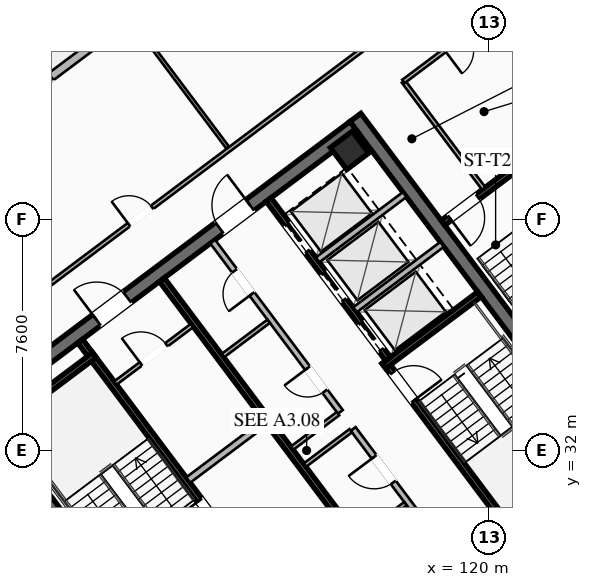
"""IFC4 building model, lengths in metres.
Left out: names, types, materials, properties, quantities, classifications, styles, units other than length and angle.
Written with IfcOpenShell. Run it as: python <this file> out.ifc"""

import sys

from ifc_helpers import new_model, si_unit, direction, frame, frame_2d, origin, origin_2d, place, context, subcontext, project, spatial, rectangle, hollow_rectangle, extrude, element, fill, save


model = new_model("IFC4")
c1 = context("Model", 3, precision=1e-05, world=origin(), true_north=direction((0.0, 1.0)))
c2 = subcontext(c1, "Body", "Model", "MODEL_VIEW")
j1 = project(units=[si_unit("LENGTHUNIT", "METRE"), si_unit("PLANEANGLEUNIT", "RADIAN")], contexts=[c1])
p1 = place(None, origin())
s1 = spatial("IfcSite", under=j1, at=p1, CompositionType="ELEMENT")
p2 = place(p1, origin())
s2 = spatial("IfcBuilding", under=s1, at=p2, CompositionType="ELEMENT")
p3 = place(p2, frame((0.0, 0.0, 236.15)))
s3 = spatial("IfcBuildingStorey", under=s2, at=p3, CompositionType="ELEMENT", Elevation=236.15)
for number, where, z_axis, x_axis in (
    (1, (112.396, 21.047, 0.0), (0.0, 0.0, 1.0), (-0.6, 0.8, 0.0)),
    (2, (115.604, 42.953, 0.0), (0.0, 0.0, 1.0), (0.6, -0.8, 0.0)),
):
    element("IfcWall", number, at=place(p3, frame(where, z_axis=z_axis, x_axis=x_axis)), inside=s3, PredefinedType="SHEAR", context=c2, shape_type="SweptSolid", body=[
        extrude(rectangle(XDim=15.6, YDim=0.45, at=frame_2d((7.8, 0.0))), origin(), (0.0, 0.0, 1.0), 3.55),
    ])
p4 = place(p3, frame((124.649, 30.518, 0.0), z_axis=(0.0, 0.0, 1.0), x_axis=(-0.8, -0.6, 0.0)))
e3 = element("IfcWall", 3, at=p4, inside=s3, PredefinedType="SHEAR", context=c2, shape_type="SweptSolid", body=[
    extrude(rectangle(XDim=15.26, YDim=0.45, at=frame_2d((7.63, 0.0))), origin(), (0.0, 0.0, 1.0), 3.55),
])
p5 = place(p4, frame((9.33, 0.0, 0.0)))
e4 = element("IfcOpeningElement", 4, at=p5, cuts=e3, PredefinedType="OPENING", context=c2, shape_type="SweptSolid", body=[
    extrude(rectangle(XDim=1.25, YDim=2.25, at=frame_2d((0.625, 1.125))), frame((0.0, 0.235, 0.0), z_axis=(0.0, -1.0, 0.0), x_axis=(1.0, 0.0, 0.0)), (0.0, 0.0, 1.0), 0.47),
])
p6 = place(p4, frame((4.28, 0.0, 0.0)))
e5 = element("IfcOpeningElement", 5, at=p6, cuts=e3, PredefinedType="OPENING", context=c2, shape_type="SweptSolid", body=[
    extrude(rectangle(XDim=1.25, YDim=2.25, at=frame_2d((0.625, 1.125))), frame((0.0, 0.235, 0.0), z_axis=(0.0, -1.0, 0.0), x_axis=(1.0, 0.0, 0.0)), (0.0, 0.0, 1.0), 0.47),
])
p7 = place(p3, frame((103.351, 33.482, 0.0), z_axis=(0.0, 0.0, 1.0), x_axis=(0.8, 0.6, 0.0)))
e6 = element("IfcWall", 6, at=p7, inside=s3, PredefinedType="SHEAR", context=c2, shape_type="SweptSolid", body=[
    extrude(rectangle(XDim=15.26, YDim=0.45, at=frame_2d((7.63, 0.0))), origin(), (0.0, 0.0, 1.0), 3.55),
])
p8 = place(p7, frame((4.68, 0.0, 0.0)))
e7 = element("IfcOpeningElement", 7, at=p8, cuts=e6, PredefinedType="OPENING", context=c2, shape_type="SweptSolid", body=[
    extrude(rectangle(XDim=1.25, YDim=2.25, at=frame_2d((0.625, 1.125))), frame((0.0, 0.235, 0.0), z_axis=(0.0, -1.0, 0.0), x_axis=(1.0, 0.0, 0.0)), (0.0, 0.0, 1.0), 0.47),
])
p9 = place(p7, frame((9.73, 0.0, 0.0)))
e8 = element("IfcOpeningElement", 8, at=p9, cuts=e6, PredefinedType="OPENING", context=c2, shape_type="SweptSolid", body=[
    extrude(rectangle(XDim=1.25, YDim=2.25, at=frame_2d((0.625, 1.125))), frame((0.0, 0.235, 0.0), z_axis=(0.0, -1.0, 0.0), x_axis=(1.0, 0.0, 0.0)), (0.0, 0.0, 1.0), 0.47),
])
p10 = place(p3, frame((115.41, 41.87, 0.0), z_axis=(0.0, 0.0, 1.0), x_axis=(0.799999996291, 0.600000004945, 0.0)))
e9 = element("IfcColumn", 9, at=p10, inside=s3, PredefinedType="COLUMN", context=c2, shape_type="SweptSolid", body=[
    extrude(hollow_rectangle(XDim=0.9, YDim=0.9, WallThickness=0.04, at=origin_2d()), origin(), (0.0, 0.0, 1.0), 3.37),
])
p11 = place(p3, frame((101.672, 41.354, 0.0), z_axis=(0.0, 0.0, 1.0), x_axis=(0.799986212866, 0.600018382406, 0.0)))
e10 = element("IfcWall", 10, at=p11, inside=s3, PredefinedType="SOLIDWALL", context=c2, shape_type="SweptSolid", body=[
    extrude(rectangle(XDim=8.5, YDim=0.28, at=frame_2d((4.25, 0.0))), origin(), (0.0, 0.0, 1.0), 3.37),
])
p12 = place(p11, frame((3.6, 0.0, 0.0)))
e11 = element("IfcOpeningElement", 11, at=p12, cuts=e10, PredefinedType="OPENING", context=c2, shape_type="SweptSolid", body=[
    extrude(rectangle(XDim=1.3, YDim=2.15, at=frame_2d((0.65, 1.075))), frame((0.0, 0.15, 0.0), z_axis=(0.0, -1.0, 0.0), x_axis=(1.0, 0.0, 0.0)), (0.0, 0.0, 1.0), 0.3),
])
p13 = place(p11, frame((1.46, 0.0, 0.85)))
e12 = element("IfcOpeningElement", 12, at=p13, cuts=e10, PredefinedType="OPENING", context=c2, shape_type="SweptSolid", body=[
    extrude(rectangle(XDim=1.8, YDim=1.92, at=frame_2d((0.9, 0.96))), frame((0.0, 0.15, 0.0), z_axis=(0.0, -1.0, 0.0), x_axis=(1.0, 0.0, 0.0)), (0.0, 0.0, 1.0), 0.3),
])
p14 = place(p3, frame((111.44, 29.08, 0.0), z_axis=(0.0, 0.0, 1.0), x_axis=(-0.59999041401, 0.800007189403, 0.0)))
e13 = element("IfcWall", 13, at=p14, inside=s3, PredefinedType="SHEAR", context=c2, shape_type="SweptSolid", body=[
    extrude(rectangle(XDim=8.15, YDim=0.2, at=frame_2d((4.075, 0.0))), origin(), (0.0, 0.0, 1.0), 3.37),
])
p15 = place(p14, frame((0.45, 0.0, 0.0)))
e14 = element("IfcOpeningElement", 14, at=p15, cuts=e13, PredefinedType="OPENING", context=c2, shape_type="SweptSolid", body=[
    extrude(rectangle(XDim=1.15, YDim=2.2, at=frame_2d((0.575, 1.1))), frame((0.0, 0.11, 0.0), z_axis=(0.0, -1.0, 0.0), x_axis=(1.0, 0.0, 0.0)), (0.0, 0.0, 1.0), 0.22),
])
p16 = place(p3, frame((103.876, 32.782, 0.0), z_axis=(0.0, 0.0, 1.0), x_axis=(0.800014909178, 0.599980120581, 0.0)))
e15 = element("IfcWall", 15, at=p16, inside=s3, PredefinedType="SHEAR", context=c2, shape_type="SweptSolid", body=[
    extrude(rectangle(XDim=3.93, YDim=0.2, at=frame_2d((1.965, 0.0))), origin(), (0.0, 0.0, 1.0), 3.37),
])
p17 = place(p3, frame((116.56, 34.92, 0.0), z_axis=(0.0, 0.0, 1.0), x_axis=(0.59999041401, -0.800007189403, 0.0)))
e16 = element("IfcWall", 16, at=p17, inside=s3, PredefinedType="SHEAR", context=c2, shape_type="SweptSolid", body=[
    extrude(rectangle(XDim=8.15, YDim=0.2, at=frame_2d((4.075, 0.0))), origin(), (0.0, 0.0, 1.0), 3.37),
])
p18 = place(p17, frame((0.45, 0.0, 0.0)))
e17 = element("IfcOpeningElement", 17, at=p18, cuts=e16, PredefinedType="OPENING", context=c2, shape_type="SweptSolid", body=[
    extrude(rectangle(XDim=1.15, YDim=2.2, at=frame_2d((0.575, 1.1))), frame((0.0, 0.11, 0.0), z_axis=(0.0, -1.0, 0.0), x_axis=(1.0, 0.0, 0.0)), (0.0, 0.0, 1.0), 0.22),
])
p19 = place(p3, frame((116.54, 34.78, 0.0), z_axis=(0.0, 0.0, 1.0), x_axis=(0.800014909178, 0.599980120581, 0.0)))
e18 = element("IfcWall", 18, at=p19, inside=s3, PredefinedType="SHEAR", context=c2, shape_type="SweptSolid", body=[
    extrude(rectangle(XDim=3.93, YDim=0.2, at=frame_2d((1.965, 0.0))), origin(), (0.0, 0.0, 1.0), 3.37),
])
p20 = place(p3, frame((118.058, 25.856, 0.0), z_axis=(0.0, 0.0, 1.0), x_axis=(-0.600002657301, 0.799998007018, 0.0)))
e19 = element("IfcWall", 19, at=p20, inside=s3, PredefinedType="SHEAR", context=c2, shape_type="SweptSolid", body=[
    extrude(rectangle(XDim=14.7, YDim=0.2, at=frame_2d((7.35, 0.0))), origin(), (0.0, 0.0, 1.0), 3.37),
])
p21 = place(p3, frame((110.104, 31.028, 0.0), z_axis=(0.0, 0.0, 1.0), x_axis=(0.800018601094, 0.59997519774, 0.0)))
e20 = element("IfcWall", 20, at=p21, inside=s3, PredefinedType="SOLIDWALL", context=c2, shape_type="SweptSolid", body=[
    extrude(rectangle(XDim=3.15, YDim=0.22, at=frame_2d((1.575, 0.0))), origin(), (0.0, 0.0, 1.0), 2.723),
])
p22 = place(p3, frame((112.75, 40.25, 0.0), z_axis=(0.0, 0.0, 1.0), x_axis=(0.599994036198, -0.800004472816, 0.0)))
e21 = element("IfcWall", 21, at=p22, inside=s3, PredefinedType="SHEAR", context=c2, shape_type="SweptSolid", body=[
    extrude(rectangle(XDim=6.55, YDim=0.2, at=frame_2d((3.275, 0.0))), origin(), (0.0, 0.0, 1.0), 3.37),
])
p23 = place(p22, frame((5.075, 0.0, 0.0)))
e22 = element("IfcOpeningElement", 22, at=p23, cuts=e21, PredefinedType="OPENING", context=c2, shape_type="SweptSolid", body=[
    extrude(rectangle(XDim=1.1, YDim=2.2, at=frame_2d((0.55, 1.1))), frame((0.0, 0.11, 0.0), z_axis=(0.0, -1.0, 0.0), x_axis=(1.0, 0.0, 0.0)), (0.0, 0.0, 1.0), 0.22),
])
p24 = place(p22, frame((3.025, 0.0, 0.0)))
e23 = element("IfcOpeningElement", 23, at=p24, cuts=e21, PredefinedType="OPENING", context=c2, shape_type="SweptSolid", body=[
    extrude(rectangle(XDim=1.1, YDim=2.2, at=frame_2d((0.55, 1.1))), frame((0.0, 0.11, 0.0), z_axis=(0.0, -1.0, 0.0), x_axis=(1.0, 0.0, 0.0)), (0.0, 0.0, 1.0), 0.22),
])
p25 = place(p22, frame((1.025, 0.0, 0.0)))
e24 = element("IfcOpeningElement", 24, at=p25, cuts=e21, PredefinedType="OPENING", context=c2, shape_type="SweptSolid", body=[
    extrude(rectangle(XDim=1.1, YDim=2.2, at=frame_2d((0.55, 1.1))), frame((0.0, 0.11, 0.0), z_axis=(0.0, -1.0, 0.0), x_axis=(1.0, 0.0, 0.0)), (0.0, 0.0, 1.0), 0.22),
])
for number, where, z_axis, x_axis in (
    (25, (115.59, 36.63, 0.0), (0.0, 0.0, 1.0), (0.8, 0.6, 0.0)),
    (26, (114.36, 38.27, 0.0), (0.0, 0.0, 1.0), (0.8, 0.6, 0.0)),
):
    element("IfcWall", number, at=place(p3, frame(where, z_axis=z_axis, x_axis=x_axis)), inside=s3, PredefinedType="SOLIDWALL", context=c2, shape_type="SweptSolid", body=[
        extrude(rectangle(XDim=3.58, YDim=0.2, at=frame_2d((1.79, 0.0))), origin(), (0.0, 0.0, 1.0), 3.37),
    ])
p26 = place(p3, frame((107.71, 34.22, 0.0), z_axis=(0.0, 0.0, 1.0), x_axis=(0.799981399002, 0.60002480053, 0.0)))
e27 = element("IfcWall", 27, at=p26, inside=s3, PredefinedType="PARTITIONING", context=c2, shape_type="SweptSolid", body=[
    extrude(rectangle(XDim=3.15, YDim=0.135, at=frame_2d((1.575, 0.0))), origin(), (0.0, 0.0, 1.0), 2.723),
])
p27 = place(p26, frame((1.05, 0.0, 0.0)))
e28 = element("IfcOpeningElement", 28, at=p27, cuts=e27, PredefinedType="OPENING", context=c2, shape_type="SweptSolid", body=[
    extrude(rectangle(XDim=1.05, YDim=2.2, at=frame_2d((0.525, 1.1))), frame((0.0, 0.077, 0.0), z_axis=(0.0, -1.0, 0.0), x_axis=(1.0, 0.0, 0.0)), (0.0, 0.0, 1.0), 0.155),
])
p28 = place(p3, frame((119.73, 27.11, 0.0), z_axis=(0.0, 0.0, 1.0), x_axis=(-0.600005580459, 0.799995814625, 0.0)))
e29 = element("IfcWall", 29, at=p28, inside=s3, PredefinedType="SOLIDWALL", context=c2, shape_type="SweptSolid", body=[
    extrude(rectangle(XDim=7.0, YDim=0.2, at=frame_2d((3.5, 0.0))), origin(), (0.0, 0.0, 1.0), 2.723),
])
p29 = place(p28, frame((0.85, 0.0, 0.0)))
e30 = element("IfcOpeningElement", 30, at=p29, cuts=e29, PredefinedType="OPENING", context=c2, shape_type="SweptSolid", body=[
    extrude(rectangle(XDim=0.95, YDim=2.05, at=frame_2d((0.475, 1.025))), frame((0.0, 0.11, 0.0), z_axis=(0.0, -1.0, 0.0), x_axis=(1.0, 0.0, 0.0)), (0.0, 0.0, 1.0), 0.22),
])
p30 = place(p28, frame((4.8, 0.0, 0.0)))
e31 = element("IfcOpeningElement", 31, at=p30, cuts=e29, PredefinedType="OPENING", context=c2, shape_type="SweptSolid", body=[
    extrude(rectangle(XDim=1.05, YDim=2.2, at=frame_2d((0.525, 1.1))), frame((0.0, 0.11, 0.0), z_axis=(0.0, -1.0, 0.0), x_axis=(1.0, 0.0, 0.0)), (0.0, 0.0, 1.0), 0.22),
])
for number, where, z_axis, x_axis in (
    (32, (113.946, 31.522, 0.0), (0.0, 0.0, 1.0), (0.8, 0.6, 0.0)),
    (33, (115.746, 29.122, 0.0), (0.0, 0.0, 1.0), (0.8, 0.6, 0.0)),
):
    element("IfcWall", number, at=place(p3, frame(where, z_axis=z_axis, x_axis=x_axis)), inside=s3, PredefinedType="PARTITIONING", context=c2, shape_type="SweptSolid", body=[
        extrude(rectangle(XDim=1.88, YDim=0.135, at=frame_2d((0.94, 0.0))), origin(), (0.0, 0.0, 1.0), 2.723),
    ])
p31 = place(p3, frame((115.11, 33.27, 0.0), z_axis=(0.0, 0.0, 1.0), x_axis=(-0.600011160345, 0.79999162962, 0.0)))
e34 = element("IfcWall", 34, at=p31, inside=s3, PredefinedType="SOLIDWALL", context=c2, shape_type="SweptSolid", body=[
    extrude(rectangle(XDim=7.0, YDim=0.2, at=frame_2d((3.5, 0.0))), origin(), (0.0, 0.0, 1.0), 2.723),
])
p32 = place(p31, frame((0.85, 0.0, 0.0)))
e35 = element("IfcOpeningElement", 35, at=p32, cuts=e34, PredefinedType="OPENING", context=c2, shape_type="SweptSolid", body=[
    extrude(rectangle(XDim=0.95, YDim=2.05, at=frame_2d((0.475, 1.025))), frame((0.0, 0.11, 0.0), z_axis=(0.0, -1.0, 0.0), x_axis=(1.0, 0.0, 0.0)), (0.0, 0.0, 1.0), 0.22),
])
p33 = place(p31, frame((4.85, 0.0, 0.0)))
e36 = element("IfcOpeningElement", 36, at=p33, cuts=e34, PredefinedType="OPENING", context=c2, shape_type="SweptSolid", body=[
    extrude(rectangle(XDim=0.95, YDim=2.05, at=frame_2d((0.475, 1.025))), frame((0.0, 0.11, 0.0), z_axis=(0.0, -1.0, 0.0), x_axis=(1.0, 0.0, 0.0)), (0.0, 0.0, 1.0), 0.22),
])
p34 = place(p3, frame((113.526, 32.082, 0.0), z_axis=(0.0, 0.0, 1.0), x_axis=(0.800046745961, 0.599937666993, 0.0)))
e37 = element("IfcWall", 37, at=p34, inside=s3, PredefinedType="PARTITIONING", context=c2, shape_type="SweptSolid", body=[
    extrude(rectangle(XDim=1.88, YDim=0.135, at=frame_2d((0.94, 0.0))), origin(), (0.0, 0.0, 1.0), 2.723),
])
p35 = place(p3, frame((111.246, 35.122, 0.0), z_axis=(0.0, 0.0, 1.0), x_axis=(0.8, 0.6, 0.0)))
e38 = element("IfcWall", 38, at=p35, inside=s3, PredefinedType="PARTITIONING", context=c2, shape_type="SweptSolid", body=[
    extrude(rectangle(XDim=1.88, YDim=0.135, at=frame_2d((0.94, 0.0))), origin(), (0.0, 0.0, 1.0), 2.723),
])
p36 = place(p3, frame((121.204, 41.528, 0.0), z_axis=(0.0, 0.0, 1.0), x_axis=(-0.800017232136, -0.599977023131, 0.0)))
e39 = element("IfcWall", 39, at=p36, inside=s3, PredefinedType="SHEAR", context=c2, shape_type="SweptSolid", body=[
    extrude(rectangle(XDim=3.4, YDim=0.2, at=frame_2d((1.7, 0.0))), origin(), (0.0, 0.0, 1.0), 3.37),
])
p37 = place(p36, frame((1.975, 0.0, 0.0)))
e40 = element("IfcOpeningElement", 40, at=p37, cuts=e39, PredefinedType="OPENING", context=c2, shape_type="SweptSolid", body=[
    extrude(rectangle(XDim=1.15, YDim=2.2, at=frame_2d((0.575, 1.1))), frame((0.0, 0.11, 0.0), z_axis=(0.0, -1.0, 0.0), x_axis=(1.0, 0.0, 0.0)), (0.0, 0.0, 1.0), 0.22),
])
p38 = place(p3, frame((119.824, 40.618, 0.0), z_axis=(0.0, 0.0, 1.0), x_axis=(-0.599982243973, 0.800013316712, 0.0)))
e41 = element("IfcWall", 41, at=p38, inside=s3, PredefinedType="PARTITIONING", context=c2, shape_type="SweptSolid", body=[
    extrude(rectangle(XDim=4.4, YDim=0.135, at=frame_2d((2.2, 0.0))), origin(), (0.0, 0.0, 1.0), 2.723),
])
p39 = place(p3, frame((99.746, 33.122, 0.0), z_axis=(0.0, 0.0, 1.0), x_axis=(0.800001242445, 0.599998343403, 0.0)))
e42 = element("IfcWall", 42, at=p39, inside=s3, PredefinedType="PARTITIONING", context=c2, shape_type="SweptSolid", body=[
    extrude(rectangle(XDim=23.58, YDim=0.135, at=frame_2d((11.79, 0.0))), origin(), (0.0, 0.0, 1.0), 2.723),
])
p40 = place(p39, frame((0.3, 0.0, 0.0)))
e43 = element("IfcOpeningElement", 43, at=p40, cuts=e42, PredefinedType="OPENING", context=c2, shape_type="SweptSolid", body=[
    extrude(rectangle(XDim=0.95, YDim=2.05, at=frame_2d((0.475, 1.025))), frame((0.0, 0.077, 0.0), z_axis=(0.0, -1.0, 0.0), x_axis=(1.0, 0.0, 0.0)), (0.0, 0.0, 1.0), 0.155),
])
p41 = place(p39, frame((10.512, 0.0, 0.0)))
e44 = element("IfcOpeningElement", 44, at=p41, cuts=e42, PredefinedType="OPENING", context=c2, shape_type="SweptSolid", body=[
    extrude(rectangle(XDim=0.95, YDim=2.05, at=frame_2d((0.475, 1.025))), frame((0.0, 0.077, 0.0), z_axis=(0.0, -1.0, 0.0), x_axis=(1.0, 0.0, 0.0)), (0.0, 0.0, 1.0), 0.155),
])
p42 = place(p39, frame((22.33, 0.0, 0.0)))
e45 = element("IfcOpeningElement", 45, at=p42, cuts=e42, PredefinedType="OPENING", context=c2, shape_type="SweptSolid", body=[
    extrude(rectangle(XDim=0.95, YDim=2.05, at=frame_2d((0.475, 1.025))), frame((0.0, 0.077, 0.0), z_axis=(0.0, -1.0, 0.0), x_axis=(1.0, 0.0, 0.0)), (0.0, 0.0, 1.0), 0.155),
])
p43 = place(p3, frame((111.402, 41.964, 0.0), z_axis=(0.0, 0.0, 1.0), x_axis=(-0.60002253582, 0.799983097639, 0.0)))
e46 = element("IfcWall", 46, at=p43, inside=s3, PredefinedType="PARTITIONING", context=c2, shape_type="SweptSolid", body=[
    extrude(rectangle(XDim=5.2, YDim=0.11, at=frame_2d((2.6, 0.0))), origin(), (0.0, 0.0, 1.0), 2.723),
])
p44 = place(p3, frame((121.224, 47.168, 0.0), z_axis=(0.0, 0.0, 1.0), x_axis=(-0.8, -0.6, 0.0)))
e47 = element("IfcWall", 47, at=p44, inside=s3, PredefinedType="PARTITIONING", context=c2, shape_type="SweptSolid", body=[
    extrude(rectangle(XDim=5.05, YDim=0.135, at=frame_2d((2.525, 0.0))), origin(), (0.0, 0.0, 1.0), 2.723),
])
p45 = place(p44, frame((2.4, 0.0, 0.0)))
e48 = element("IfcOpeningElement", 48, at=p45, cuts=e47, PredefinedType="OPENING", context=c2, shape_type="SweptSolid", body=[
    extrude(rectangle(XDim=0.95, YDim=2.05, at=frame_2d((0.475, 1.025))), frame((0.0, 0.077, 0.0), z_axis=(0.0, -1.0, 0.0), x_axis=(1.0, 0.0, 0.0)), (0.0, 0.0, 1.0), 0.155),
])
p46 = place(p3, frame((111.86, 16.97, 0.0), z_axis=(0.0, 0.0, 1.0), x_axis=(-0.60000194242, 0.799998543181, 0.0)))
e49 = element("IfcWall", 49, at=p46, inside=s3, PredefinedType="PARTITIONING", context=c2, shape_type="SweptSolid", body=[
    extrude(rectangle(XDim=20.11, YDim=0.135, at=frame_2d((10.055, 0.0))), origin(), (0.0, 0.0, 1.0), 2.723),
])
p47 = place(p46, frame((0.3, 0.0, 0.0)))
e50 = element("IfcOpeningElement", 50, at=p47, cuts=e49, PredefinedType="OPENING", context=c2, shape_type="SweptSolid", body=[
    extrude(rectangle(XDim=0.95, YDim=2.05, at=frame_2d((0.475, 1.025))), frame((0.0, 0.077, 0.0), z_axis=(0.0, -1.0, 0.0), x_axis=(1.0, 0.0, 0.0)), (0.0, 0.0, 1.0), 0.155),
])
p48 = place(p8, origin())
e51 = element("IfcDoor", 51, at=p48, inside=s3, OperationType="SINGLE_SWING_LEFT", PredefinedType="DOOR", context=c2, shape_type="SweptSolid", body=[
    extrude(rectangle(XDim=1.25, YDim=2.25, at=frame_2d((0.625, 1.125))), frame((0.0, 0.025, 0.0), z_axis=(0.0, -1.0, 0.0), x_axis=(1.0, 0.0, 0.0)), (0.0, 0.0, 1.0), 0.05),
])
fill(e7, e51)
p49 = place(p9, origin())
e52 = element("IfcDoor", 52, at=p49, inside=s3, OperationType="SINGLE_SWING_RIGHT", PredefinedType="DOOR", context=c2, shape_type="SweptSolid", body=[
    extrude(rectangle(XDim=1.25, YDim=2.25, at=frame_2d((0.625, 1.125))), frame((0.0, 0.025, 0.0), z_axis=(0.0, -1.0, 0.0), x_axis=(1.0, 0.0, 0.0)), (0.0, 0.0, 1.0), 0.05),
])
fill(e8, e52)
p50 = place(p15, origin())
e53 = element("IfcDoor", 53, at=p50, inside=s3, OperationType="SINGLE_SWING_RIGHT", PredefinedType="DOOR", context=c2, shape_type="SweptSolid", body=[
    extrude(rectangle(XDim=1.15, YDim=2.2, at=frame_2d((0.575, 1.1))), frame((0.0, 0.025, 0.0), z_axis=(0.0, -1.0, 0.0), x_axis=(1.0, 0.0, 0.0)), (0.0, 0.0, 1.0), 0.05),
])
fill(e14, e53)
p51 = place(p18, origin())
e54 = element("IfcDoor", 54, at=p51, inside=s3, OperationType="SINGLE_SWING_RIGHT", PredefinedType="DOOR", context=c2, shape_type="SweptSolid", body=[
    extrude(rectangle(XDim=1.15, YDim=2.2, at=frame_2d((0.575, 1.1))), frame((0.0, 0.025, 0.0), z_axis=(0.0, -1.0, 0.0), x_axis=(1.0, 0.0, 0.0)), (0.0, 0.0, 1.0), 0.05),
])
fill(e17, e54)
p52 = place(p27, origin())
e55 = element("IfcDoor", 55, at=p52, inside=s3, OperationType="SINGLE_SWING_LEFT", PredefinedType="DOOR", context=c2, shape_type="SweptSolid", body=[
    extrude(rectangle(XDim=1.05, YDim=2.2, at=frame_2d((0.525, 1.1))), frame((0.0, 0.025, 0.0), z_axis=(0.0, -1.0, 0.0), x_axis=(1.0, 0.0, 0.0)), (0.0, 0.0, 1.0), 0.05),
])
fill(e28, e55)
p53 = place(p30, origin())
e56 = element("IfcDoor", 56, at=p53, inside=s3, OperationType="SINGLE_SWING_RIGHT", PredefinedType="DOOR", context=c2, shape_type="SweptSolid", body=[
    extrude(rectangle(XDim=1.05, YDim=2.2, at=frame_2d((0.525, 1.1))), frame((0.0, 0.025, 0.0), z_axis=(0.0, -1.0, 0.0), x_axis=(1.0, 0.0, 0.0)), (0.0, 0.0, 1.0), 0.05),
])
fill(e31, e56)
p54 = place(p32, origin())
e57 = element("IfcDoor", 57, at=p54, inside=s3, OperationType="SINGLE_SWING_RIGHT", PredefinedType="DOOR", context=c2, shape_type="SweptSolid", body=[
    extrude(rectangle(XDim=0.95, YDim=2.05, at=frame_2d((0.475, 1.025))), frame((0.0, 0.025, 0.0), z_axis=(0.0, -1.0, 0.0), x_axis=(1.0, 0.0, 0.0)), (0.0, 0.0, 1.0), 0.05),
])
fill(e35, e57)
p55 = place(p33, origin())
e58 = element("IfcDoor", 58, at=p55, inside=s3, OperationType="SINGLE_SWING_LEFT", PredefinedType="DOOR", context=c2, shape_type="SweptSolid", body=[
    extrude(rectangle(XDim=0.95, YDim=2.05, at=frame_2d((0.475, 1.025))), frame((0.0, 0.025, 0.0), z_axis=(0.0, -1.0, 0.0), x_axis=(1.0, 0.0, 0.0)), (0.0, 0.0, 1.0), 0.05),
])
fill(e36, e58)
p56 = place(p37, origin())
e59 = element("IfcDoor", 59, at=p56, inside=s3, OperationType="SINGLE_SWING_RIGHT", PredefinedType="DOOR", context=c2, shape_type="SweptSolid", body=[
    extrude(rectangle(XDim=1.15, YDim=2.2, at=frame_2d((0.575, 1.1))), frame((0.0, 0.025, 0.0), z_axis=(0.0, -1.0, 0.0), x_axis=(1.0, 0.0, 0.0)), (0.0, 0.0, 1.0), 0.05),
])
fill(e40, e59)
p57 = place(p41, origin())
e60 = element("IfcDoor", 60, at=p57, inside=s3, OperationType="SINGLE_SWING_LEFT", PredefinedType="DOOR", context=c2, shape_type="SweptSolid", body=[
    extrude(rectangle(XDim=0.95, YDim=2.05, at=frame_2d((0.475, 1.025))), frame((0.0, 0.025, 0.0), z_axis=(0.0, -1.0, 0.0), x_axis=(1.0, 0.0, 0.0)), (0.0, 0.0, 1.0), 0.05),
])
fill(e44, e60)
p58 = place(p23, origin())
e61 = element("IfcDoor", 61, at=p58, inside=s3, OperationType="SLIDING_TO_LEFT", PredefinedType="DOOR", context=c2, shape_type="SweptSolid", body=[
    extrude(rectangle(XDim=1.1, YDim=2.2, at=frame_2d((0.55, 1.1))), frame((0.0, 0.025, 0.0), z_axis=(0.0, -1.0, 0.0), x_axis=(1.0, 0.0, 0.0)), (0.0, 0.0, 1.0), 0.05),
])
fill(e22, e61)
p59 = place(p24, origin())
e62 = element("IfcDoor", 62, at=p59, inside=s3, OperationType="SLIDING_TO_LEFT", PredefinedType="DOOR", context=c2, shape_type="SweptSolid", body=[
    extrude(rectangle(XDim=1.1, YDim=2.2, at=frame_2d((0.55, 1.1))), frame((0.0, 0.025, 0.0), z_axis=(0.0, -1.0, 0.0), x_axis=(1.0, 0.0, 0.0)), (0.0, 0.0, 1.0), 0.05),
])
fill(e23, e62)
p60 = place(p25, origin())
e63 = element("IfcDoor", 63, at=p60, inside=s3, OperationType="SLIDING_TO_LEFT", PredefinedType="DOOR", context=c2, shape_type="SweptSolid", body=[
    extrude(rectangle(XDim=1.1, YDim=2.2, at=frame_2d((0.55, 1.1))), frame((0.0, 0.025, 0.0), z_axis=(0.0, -1.0, 0.0), x_axis=(1.0, 0.0, 0.0)), (0.0, 0.0, 1.0), 0.05),
])
fill(e24, e63)
save(model, sys.argv[1])
